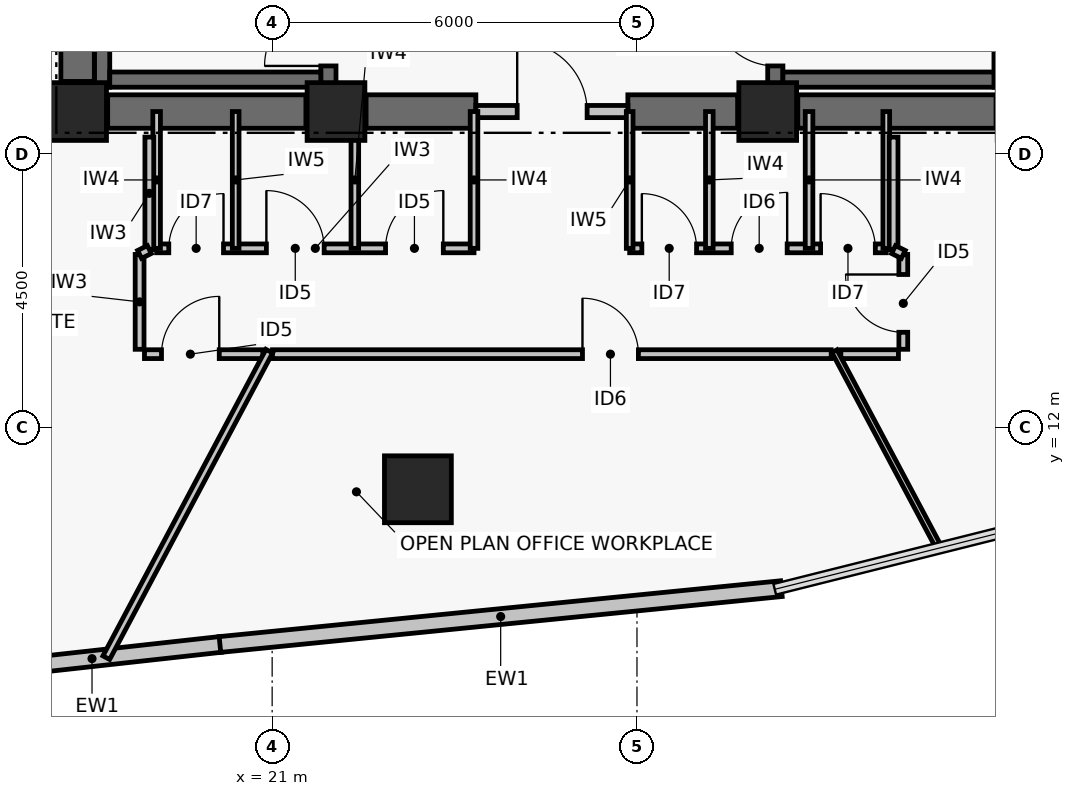
"""IFC4 building model, lengths in metres.
Left out: names, types, materials, properties, quantities, classifications, styles, units other than length and angle.
Written with IfcOpenShell. Run it as: python <this file> out.ifc"""

import sys

from ifc_helpers import new_model, si_unit, direction, frame, frame_2d, origin, origin_2d, place, context, subcontext, project, spatial, rectangle, hollow_rectangle, extrude, element, fill, save


model = new_model("IFC4")
c1 = context("Model", 3, precision=1e-05, world=origin(), true_north=direction((0.0, 1.0)))
c2 = subcontext(c1, "Body", "Model", "MODEL_VIEW")
j1 = project(units=[si_unit("LENGTHUNIT", "METRE"), si_unit("PLANEANGLEUNIT", "RADIAN")], contexts=[c1])
p1 = place(None, origin())
s1 = spatial("IfcSite", under=j1, at=p1, CompositionType="ELEMENT")
p2 = place(p1, origin())
s2 = spatial("IfcBuilding", under=s1, at=p2, CompositionType="ELEMENT")
p3 = place(p2, frame((0.0, 0.0, 161.76)))
s3 = spatial("IfcBuildingStorey", under=s2, at=p3, CompositionType="ELEMENT", Elevation=161.76)
for number, where, z_axis, x_axis in (
    (1, (17.8, 17.2, 0.0), (0.0, 0.0, 1.0), (1.0, 0.0, 0.0)),
    (2, (22.05, 17.2, 0.0), (0.0, 0.0, 1.0), (1.0, 0.0, 0.0)),
    (3, (29.15, 17.2, 0.0), (0.0, 0.0, 1.0), (1.0, 0.0, 0.0)),
):
    element("IfcColumn", number, at=place(p3, frame(where, z_axis=z_axis, x_axis=x_axis)), inside=s3, PredefinedType="COLUMN", context=c2, shape_type="SweptSolid", body=[
        extrude(rectangle(XDim=0.95, YDim=0.95, at=origin_2d()), origin(), (0.0, 0.0, 1.0), 3.72),
    ])
p4 = place(p3, frame((18.295, 17.2, 0.0), z_axis=(0.0, 0.0, 1.0), x_axis=(1.0, 0.0, 0.0)))
e4 = element("IfcWall", 4, at=p4, inside=s3, PredefinedType="SHEAR", context=c2, shape_type="SweptSolid", body=[
    extrude(rectangle(XDim=3.26, YDim=0.55, at=frame_2d((1.63, 0.0))), origin(), (0.0, 0.0, 1.0), 3.5),
])
p5 = place(p3, frame((22.545, 17.2, 0.0), z_axis=(0.0, 0.0, 1.0), x_axis=(1.0, 0.0, 0.0)))
e5 = element("IfcWall", 5, at=p5, inside=s3, PredefinedType="SHEAR", context=c2, shape_type="SweptSolid", body=[
    extrude(rectangle(XDim=1.805, YDim=0.55, at=frame_2d((0.903, 0.0))), origin(), (0.0, 0.0, 1.0), 3.5),
])
p6 = place(p3, frame((26.85, 17.2, 0.0), z_axis=(0.0, 0.0, 1.0), x_axis=(1.0, 0.0, 0.0)))
e6 = element("IfcWall", 6, at=p6, inside=s3, PredefinedType="SHEAR", context=c2, shape_type="SweptSolid", body=[
    extrude(rectangle(XDim=1.805, YDim=0.55, at=frame_2d((0.902, 0.0))), origin(), (0.0, 0.0, 1.0), 3.5),
])
p7 = place(p3, frame((29.645, 17.2, 0.0), z_axis=(0.0, 0.0, 1.0), x_axis=(1.0, 0.0, 0.0)))
e7 = element("IfcWall", 7, at=p7, inside=s3, PredefinedType="SHEAR", context=c2, shape_type="SweptSolid", body=[
    extrude(rectangle(XDim=3.26, YDim=0.55, at=frame_2d((1.63, 0.0))), origin(), (0.0, 0.0, 1.0), 3.5),
])
p8 = place(p3, frame((17.8, 17.695, 0.0), z_axis=(0.0, 0.0, 1.0), x_axis=(0.0, 1.0, 0.0)))
e8 = element("IfcWall", 8, at=p8, inside=s3, PredefinedType="SHEAR", context=c2, shape_type="SweptSolid", body=[
    extrude(rectangle(XDim=8.61, YDim=0.55, at=frame_2d((4.305, 0.0))), origin(), (0.0, 0.0, 1.0), 3.5),
])
p9 = place(p3, frame((18.204, 17.6, 0.0), z_axis=(0.0, 0.0, 1.0), x_axis=(0.0, 1.0, 0.0)))
e9 = element("IfcWall", 9, at=p9, inside=s3, PredefinedType="SHEAR", context=c2, shape_type="SweptSolid", body=[
    extrude(rectangle(XDim=8.8, YDim=0.25, at=frame_2d((4.4, 0.0))), origin(), (0.0, 0.0, 1.0), 3.5),
])
p10 = place(p3, frame((21.925, 17.6, 0.0), z_axis=(0.0, 0.0, 1.0), x_axis=(0.0, 1.0, 0.0)))
e10 = element("IfcWall", 10, at=p10, inside=s3, PredefinedType="SHEAR", context=c2, shape_type="SweptSolid", body=[
    extrude(rectangle(XDim=8.8, YDim=0.25, at=frame_2d((4.4, 0.0))), origin(), (0.0, 0.0, 1.0), 3.5),
])
p11 = place(p10, frame((0.35, 0.0, 0.0)))
e11 = element("IfcOpeningElement", 11, at=p11, cuts=e10, PredefinedType="OPENING", context=c2, shape_type="SweptSolid", body=[
    extrude(rectangle(XDim=1.05, YDim=2.08, at=frame_2d((0.525, 1.04))), frame((0.0, 0.135, 0.0), z_axis=(0.0, -1.0, 0.0), x_axis=(1.0, 0.0, 0.0)), (0.0, 0.0, 1.0), 0.27),
])
p12 = place(p3, frame((18.329, 17.725, 0.0), z_axis=(0.0, 0.0, 1.0), x_axis=(1.0, 0.0, 0.0)))
e12 = element("IfcWall", 12, at=p12, inside=s3, PredefinedType="SHEAR", context=c2, shape_type="SweptSolid", body=[
    extrude(rectangle(XDim=3.471, YDim=0.25, at=frame_2d((1.735, 0.0))), origin(), (0.0, 0.0, 1.0), 3.5),
])
p13 = place(p3, frame((29.275, 17.6, 0.0), z_axis=(0.0, 0.0, 1.0), x_axis=(0.0, 1.0, 0.0)))
e13 = element("IfcWall", 13, at=p13, inside=s3, PredefinedType="SHEAR", context=c2, shape_type="SweptSolid", body=[
    extrude(rectangle(XDim=8.8, YDim=0.25, at=frame_2d((4.4, 0.0))), origin(), (0.0, 0.0, 1.0), 3.5),
])
p14 = place(p13, frame((0.35, 0.0, 0.0)))
e14 = element("IfcOpeningElement", 14, at=p14, cuts=e13, PredefinedType="OPENING", context=c2, shape_type="SweptSolid", body=[
    extrude(rectangle(XDim=1.05, YDim=2.08, at=frame_2d((0.525, 1.04))), frame((0.0, 0.135, 0.0), z_axis=(0.0, -1.0, 0.0), x_axis=(1.0, 0.0, 0.0)), (0.0, 0.0, 1.0), 0.27),
])
p15 = place(p3, frame((32.996, 17.6, 0.0), z_axis=(0.0, 0.0, 1.0), x_axis=(0.0, 1.0, 0.0)))
e15 = element("IfcWall", 15, at=p15, inside=s3, PredefinedType="SHEAR", context=c2, shape_type="SweptSolid", body=[
    extrude(rectangle(XDim=8.8, YDim=0.25, at=frame_2d((4.4, 0.0))), origin(), (0.0, 0.0, 1.0), 3.5),
])
p16 = place(p3, frame((29.4, 17.725, 0.0), z_axis=(0.0, 0.0, 1.0), x_axis=(1.0, 0.0, 0.0)))
e16 = element("IfcWall", 16, at=p16, inside=s3, PredefinedType="SHEAR", context=c2, shape_type="SweptSolid", body=[
    extrude(rectangle(XDim=3.471, YDim=0.25, at=frame_2d((1.736, 0.0))), origin(), (0.0, 0.0, 1.0), 3.5),
])
p17 = place(p3, frame((23.397, 10.988, 0.0), z_axis=(0.0, 0.0, 1.0), x_axis=(1.0, 0.0, 0.0)))
e17 = element("IfcColumn", 17, at=p17, inside=s3, PredefinedType="COLUMN", context=c2, shape_type="SweptSolid", body=[
    extrude(hollow_rectangle(XDim=1.1, YDim=1.1, WallThickness=0.045, at=origin_2d()), origin(), (0.0, 0.0, 1.0), 3.72),
])
p18 = place(p3, frame((20.153, 8.437, 0.0), z_axis=(0.0, 0.0, 1.0), x_axis=(-0.993933978819, -0.109978387641, 0.0)))
e18 = element("IfcWall", 18, at=p18, inside=s3, PredefinedType="PARTITIONING", context=c2, shape_type="SweptSolid", body=[
    extrude(rectangle(XDim=4.258, YDim=0.26, at=frame_2d((2.129, 0.0))), origin(), (0.0, 0.0, 1.0), 3.5),
])
p19 = place(p3, frame((29.375, 9.354, 0.0), z_axis=(0.0, 0.0, 1.0), x_axis=(-0.9950896707, -0.098977508888, 0.0)))
e19 = element("IfcWall", 19, at=p19, inside=s3, PredefinedType="PARTITIONING", context=c2, shape_type="SweptSolid", body=[
    extrude(rectangle(XDim=9.28, YDim=0.26, at=frame_2d((4.64, 0.0))), origin(), (0.0, 0.0, 1.0), 3.5),
])
p20 = place(p3, frame((24.35, 17.2, 0.0), z_axis=(0.0, 0.0, 1.0), x_axis=(1.0, 0.0, 0.0)))
e20 = element("IfcWall", 20, at=p20, inside=s3, PredefinedType="PARTITIONING", context=c2, shape_type="SweptSolid", body=[
    extrude(rectangle(XDim=2.5, YDim=0.2, at=frame_2d((1.25, 0.0))), origin(), (0.0, 0.0, 1.0), 2.63),
])
p21 = place(p20, frame((0.68, 0.0, 0.0)))
e21 = element("IfcOpeningElement", 21, at=p21, cuts=e20, PredefinedType="OPENING", context=c2, shape_type="SweptSolid", body=[
    extrude(rectangle(XDim=1.15, YDim=2.08, at=frame_2d((0.575, 1.04))), frame((0.0, 0.11, 0.0), z_axis=(0.0, -1.0, 0.0), x_axis=(1.0, 0.0, 0.0)), (0.0, 0.0, 1.0), 0.22),
])
p22 = place(p3, frame((19.1, 14.95, 0.0), z_axis=(0.0, 0.0, 1.0), x_axis=(1.0, 0.0, 0.0)))
e22 = element("IfcWall", 22, at=p22, inside=s3, PredefinedType="PARTITIONING", context=c2, shape_type="SweptSolid", body=[
    extrude(rectangle(XDim=5.22, YDim=0.145, at=frame_2d((2.61, 0.0))), origin(), (0.0, 0.0, 1.0), 2.73),
])
p23 = place(p22, frame((0.2, 0.0, 0.0)))
e23 = element("IfcOpeningElement", 23, at=p23, cuts=e22, PredefinedType="OPENING", context=c2, shape_type="SweptSolid", body=[
    extrude(rectangle(XDim=0.9, YDim=2.02, at=frame_2d((0.45, 1.01))), frame((0.0, 0.083, 0.0), z_axis=(0.0, -1.0, 0.0), x_axis=(1.0, 0.0, 0.0)), (0.0, 0.0, 1.0), 0.165),
])
p24 = place(p22, frame((1.805, 0.0, 0.0)))
e24 = element("IfcOpeningElement", 24, at=p24, cuts=e22, PredefinedType="OPENING", context=c2, shape_type="SweptSolid", body=[
    extrude(rectangle(XDim=0.95, YDim=2.06, at=frame_2d((0.475, 1.03))), frame((0.0, 0.083, 0.0), z_axis=(0.0, -1.0, 0.0), x_axis=(1.0, 0.0, 0.0)), (0.0, 0.0, 1.0), 0.165),
])
p25 = place(p22, frame((3.765, 0.0, 0.0)))
e25 = element("IfcOpeningElement", 25, at=p25, cuts=e22, PredefinedType="OPENING", context=c2, shape_type="SweptSolid", body=[
    extrude(rectangle(XDim=0.95, YDim=2.06, at=frame_2d((0.475, 1.03))), frame((0.0, 0.083, 0.0), z_axis=(0.0, -1.0, 0.0), x_axis=(1.0, 0.0, 0.0)), (0.0, 0.0, 1.0), 0.165),
])
p26 = place(p3, frame((26.88, 14.95, 0.0), z_axis=(0.0, 0.0, 1.0), x_axis=(1.0, 0.0, 0.0)))
e26 = element("IfcWall", 26, at=p26, inside=s3, PredefinedType="PARTITIONING", context=c2, shape_type="SweptSolid", body=[
    extrude(rectangle(XDim=4.22, YDim=0.145, at=frame_2d((2.11, 0.0))), origin(), (0.0, 0.0, 1.0), 2.93),
])
p27 = place(p26, frame((0.2, 0.0, 0.0)))
e27 = element("IfcOpeningElement", 27, at=p27, cuts=e26, PredefinedType="OPENING", context=c2, shape_type="SweptSolid", body=[
    extrude(rectangle(XDim=0.9, YDim=2.02, at=frame_2d((0.45, 1.01))), frame((0.0, 0.083, 0.0), z_axis=(0.0, -1.0, 0.0), x_axis=(1.0, 0.0, 0.0)), (0.0, 0.0, 1.0), 0.165),
])
p28 = place(p26, frame((1.67, 0.0, 0.0)))
e28 = element("IfcOpeningElement", 28, at=p28, cuts=e26, PredefinedType="OPENING", context=c2, shape_type="SweptSolid", body=[
    extrude(rectangle(XDim=0.92, YDim=2.05, at=frame_2d((0.46, 1.025))), frame((0.0, 0.083, 0.0), z_axis=(0.0, -1.0, 0.0), x_axis=(1.0, 0.0, 0.0)), (0.0, 0.0, 1.0), 0.165),
])
p29 = place(p26, frame((3.14, 0.0, 0.0)))
e29 = element("IfcOpeningElement", 29, at=p29, cuts=e26, PredefinedType="OPENING", context=c2, shape_type="SweptSolid", body=[
    extrude(rectangle(XDim=0.9, YDim=2.02, at=frame_2d((0.45, 1.01))), frame((0.0, 0.083, 0.0), z_axis=(0.0, -1.0, 0.0), x_axis=(1.0, 0.0, 0.0)), (0.0, 0.0, 1.0), 0.165),
])
p30 = place(p3, frame((19.1, 14.95, 0.0), z_axis=(0.0, 0.0, 1.0), x_axis=(0.0, 1.0, 0.0)))
e30 = element("IfcWall", 30, at=p30, inside=s3, PredefinedType="PARTITIONING", context=c2, shape_type="SweptSolid", body=[
    extrude(rectangle(XDim=2.25, YDim=0.125, at=frame_2d((1.125, 0.0))), origin(), (0.0, 0.0, 1.0), 2.63),
])
p31 = place(p3, frame((20.4, 14.95, 0.0), z_axis=(0.0, 0.0, 1.0), x_axis=(0.0, 1.0, 0.0)))
e31 = element("IfcWall", 31, at=p31, inside=s3, PredefinedType="PARTITIONING", context=c2, shape_type="SweptSolid", body=[
    extrude(rectangle(XDim=2.25, YDim=0.11, at=frame_2d((1.125, 0.0))), origin(), (0.0, 0.0, 1.0), 2.63),
])
for number, where, z_axis, x_axis in (
    (32, (22.36, 14.95, 0.0), (0.0, 0.0, 1.0), (0.0, 1.0, 0.0)),
    (33, (24.32, 14.95, 0.0), (0.0, 0.0, 1.0), (0.0, 1.0, 0.0)),
):
    element("IfcWall", number, at=place(p3, frame(where, z_axis=z_axis, x_axis=x_axis)), inside=s3, PredefinedType="PARTITIONING", context=c2, shape_type="SweptSolid", body=[
        extrude(rectangle(XDim=2.25, YDim=0.125, at=frame_2d((1.125, 0.0))), origin(), (0.0, 0.0, 1.0), 2.63),
    ])
p32 = place(p3, frame((26.88, 14.95, 0.0), z_axis=(0.0, 0.0, 1.0), x_axis=(0.0, 1.0, 0.0)))
e34 = element("IfcWall", 34, at=p32, inside=s3, PredefinedType="PARTITIONING", context=c2, shape_type="SweptSolid", body=[
    extrude(rectangle(XDim=2.25, YDim=0.11, at=frame_2d((1.125, 0.0))), origin(), (0.0, 0.0, 1.0), 2.63),
])
for number, where, z_axis, x_axis in (
    (35, (28.19, 14.95, 0.0), (0.0, 0.0, 1.0), (0.0, 1.0, 0.0)),
    (36, (29.83, 14.95, 0.0), (0.0, 0.0, 1.0), (0.0, 1.0, 0.0)),
):
    element("IfcWall", number, at=place(p3, frame(where, z_axis=z_axis, x_axis=x_axis)), inside=s3, PredefinedType="PARTITIONING", context=c2, shape_type="SweptSolid", body=[
        extrude(rectangle(XDim=2.25, YDim=0.125, at=frame_2d((1.125, 0.0))), origin(), (0.0, 0.0, 1.0), 2.63),
    ])
p33 = place(p3, frame((31.1, 14.95, 0.0), z_axis=(0.0, 0.0, 1.0), x_axis=(0.0, 1.0, 0.0)))
e37 = element("IfcWall", 37, at=p33, inside=s3, PredefinedType="PARTITIONING", context=c2, shape_type="SweptSolid", body=[
    extrude(rectangle(XDim=2.25, YDim=0.11, at=frame_2d((1.125, 0.0))), origin(), (0.0, 0.0, 1.0), 2.63),
])
p34 = place(p3, frame((18.98, 16.78, 0.0), z_axis=(0.0, 0.0, 1.0), x_axis=(0.0, -1.0, 0.0)))
e38 = element("IfcWall", 38, at=p34, inside=s3, PredefinedType="PARTITIONING", context=c2, shape_type="SweptSolid", body=[
    extrude(rectangle(XDim=1.85, YDim=0.145, at=frame_2d((0.925, 0.0))), origin(), (0.0, 0.0, 1.0), 2.63),
])
p35 = place(p3, frame((18.82, 14.85, 0.0), z_axis=(0.0, 0.0, 1.0), x_axis=(0.0, -1.0, 0.0)))
e39 = element("IfcWall", 39, at=p35, inside=s3, PredefinedType="PARTITIONING", context=c2, shape_type="SweptSolid", body=[
    extrude(rectangle(XDim=1.56, YDim=0.145, at=frame_2d((0.78, 0.0))), origin(), (0.0, 0.0, 1.0), 3.08),
])
p36 = place(p3, frame((18.9, 13.21, 0.0), z_axis=(0.0, 0.0, 1.0), x_axis=(1.0, 0.0, 0.0)))
e40 = element("IfcWall", 40, at=p36, inside=s3, PredefinedType="PARTITIONING", context=c2, shape_type="SweptSolid", body=[
    extrude(rectangle(XDim=1.947, YDim=0.145, at=frame_2d((0.974, 0.0))), origin(), (0.0, 0.0, 1.0), 3.08),
])
p37 = place(p36, frame((0.28, 0.0, 0.0)))
e41 = element("IfcOpeningElement", 41, at=p37, cuts=e40, PredefinedType="OPENING", context=c2, shape_type="SweptSolid", body=[
    extrude(rectangle(XDim=0.95, YDim=2.06, at=frame_2d((0.475, 1.03))), frame((0.0, 0.083, 0.0), z_axis=(0.0, -1.0, 0.0), x_axis=(1.0, 0.0, 0.0)), (0.0, 0.0, 1.0), 0.165),
])
p38 = place(p3, frame((21.006, 13.21, 0.0), z_axis=(0.0, 0.0, 1.0), x_axis=(1.0, 0.0, 0.0)))
e42 = element("IfcWall", 42, at=p38, inside=s3, PredefinedType="PARTITIONING", context=c2, shape_type="SweptSolid", body=[
    extrude(rectangle(XDim=9.189, YDim=0.145, at=frame_2d((4.594, 0.0))), origin(), (0.0, 0.0, 1.0), 2.73),
])
p39 = place(p38, frame((5.098, 0.0, 0.0)))
e43 = element("IfcOpeningElement", 43, at=p39, cuts=e42, PredefinedType="OPENING", context=c2, shape_type="SweptSolid", body=[
    extrude(rectangle(XDim=0.92, YDim=2.05, at=frame_2d((0.46, 1.025))), frame((0.0, 0.083, 0.0), z_axis=(0.0, -1.0, 0.0), x_axis=(1.0, 0.0, 0.0)), (0.0, 0.0, 1.0), 0.165),
])
p40 = place(p3, frame((30.353, 13.21, 0.0), z_axis=(0.0, 0.0, 1.0), x_axis=(1.0, 0.0, 0.0)))
e44 = element("IfcWall", 44, at=p40, inside=s3, PredefinedType="PARTITIONING", context=c2, shape_type="SweptSolid", body=[
    extrude(rectangle(XDim=0.947, YDim=0.145, at=frame_2d((0.474, 0.0))), origin(), (0.0, 0.0, 1.0), 3.5),
])
p41 = place(p3, frame((31.38, 13.29, 0.0), z_axis=(0.0, 0.0, 1.0), x_axis=(0.0, 1.0, 0.0)))
e45 = element("IfcWall", 45, at=p41, inside=s3, PredefinedType="PARTITIONING", context=c2, shape_type="SweptSolid", body=[
    extrude(rectangle(XDim=1.56, YDim=0.145, at=frame_2d((0.78, 0.0))), origin(), (0.0, 0.0, 1.0), 3.5),
])
p42 = place(p41, frame((0.28, 0.0, 0.0)))
e46 = element("IfcOpeningElement", 46, at=p42, cuts=e45, PredefinedType="OPENING", context=c2, shape_type="SweptSolid", body=[
    extrude(rectangle(XDim=0.95, YDim=2.06, at=frame_2d((0.475, 1.03))), frame((0.0, 0.083, 0.0), z_axis=(0.0, -1.0, 0.0), x_axis=(1.0, 0.0, 0.0)), (0.0, 0.0, 1.0), 0.165),
])
p43 = place(p3, frame((31.22, 14.93, 0.0), z_axis=(0.0, 0.0, 1.0), x_axis=(0.0, 1.0, 0.0)))
e47 = element("IfcWall", 47, at=p43, inside=s3, PredefinedType="PARTITIONING", context=c2, shape_type="SweptSolid", body=[
    extrude(rectangle(XDim=1.85, YDim=0.145, at=frame_2d((0.925, 0.0))), origin(), (0.0, 0.0, 1.0), 2.63),
])
p44 = place(p3, frame((20.953, 13.26, 0.0), z_axis=(0.0, 0.0, 1.0), x_axis=(-0.469478237377, -0.882944043883, 0.0)))
e48 = element("IfcWall", 48, at=p44, inside=s3, PredefinedType="PARTITIONING", context=c2, shape_type="SweptSolid", body=[
    extrude(rectangle(XDim=5.71, YDim=0.125, at=frame_2d((2.855, 0.0))), origin(), (0.0, 0.0, 1.0), 2.93),
])
p45 = place(p3, frame((30.247, 13.26, 0.0), z_axis=(0.0, 0.0, 1.0), x_axis=(0.469475406562, -0.882945549076, 0.0)))
e49 = element("IfcWall", 49, at=p45, inside=s3, PredefinedType="PARTITIONING", context=c2, shape_type="SweptSolid", body=[
    extrude(rectangle(XDim=3.679, YDim=0.095, at=frame_2d((1.84, 0.0))), origin(), (0.0, 0.0, 1.0), 3.5),
])
for number, where, z_axis, x_axis in (
    (50, (18.82, 14.85, 0.0), (0.0, 0.0, 1.0), (0.895, 0.447, 0.0)),
    (51, (31.38, 14.85, 0.0), (0.0, 0.0, 1.0), (-0.895, 0.447, 0.0)),
):
    element("IfcWall", number, at=place(p3, frame(where, z_axis=z_axis, x_axis=x_axis)), inside=s3, PredefinedType="PARTITIONING", context=c2, shape_type="SweptSolid", body=[
        extrude(rectangle(XDim=0.179, YDim=0.145, at=frame_2d((0.089, 0.0))), origin(), (0.0, 0.0, 1.0), 3.5),
    ])
p46 = place(p11, origin())
e52 = element("IfcDoor", 52, at=p46, inside=s3, OperationType="SINGLE_SWING_LEFT", PredefinedType="DOOR", context=c2, shape_type="SweptSolid", body=[
    extrude(rectangle(XDim=1.05, YDim=2.08, at=frame_2d((0.525, 1.04))), frame((0.0, 0.025, 0.0), z_axis=(0.0, -1.0, 0.0), x_axis=(1.0, 0.0, 0.0)), (0.0, 0.0, 1.0), 0.05),
])
fill(e11, e52)
p47 = place(p14, origin())
e53 = element("IfcDoor", 53, at=p47, inside=s3, OperationType="SINGLE_SWING_RIGHT", PredefinedType="DOOR", context=c2, shape_type="SweptSolid", body=[
    extrude(rectangle(XDim=1.05, YDim=2.08, at=frame_2d((0.525, 1.04))), frame((0.0, 0.025, 0.0), z_axis=(0.0, -1.0, 0.0), x_axis=(1.0, 0.0, 0.0)), (0.0, 0.0, 1.0), 0.05),
])
fill(e14, e53)
p48 = place(p21, origin())
e54 = element("IfcDoor", 54, at=p48, inside=s3, OperationType="SINGLE_SWING_LEFT", PredefinedType="DOOR", context=c2, shape_type="SweptSolid", body=[
    extrude(rectangle(XDim=1.15, YDim=2.08, at=frame_2d((0.575, 1.04))), frame((0.0, 0.025, 0.0), z_axis=(0.0, -1.0, 0.0), x_axis=(1.0, 0.0, 0.0)), (0.0, 0.0, 1.0), 0.05),
])
fill(e21, e54)
p49 = place(p23, origin())
e55 = element("IfcDoor", 55, at=p49, inside=s3, OperationType="SINGLE_SWING_RIGHT", PredefinedType="DOOR", context=c2, shape_type="SweptSolid", body=[
    extrude(rectangle(XDim=0.9, YDim=2.02, at=frame_2d((0.45, 1.01))), frame((0.0, 0.025, 0.0), z_axis=(0.0, -1.0, 0.0), x_axis=(1.0, 0.0, 0.0)), (0.0, 0.0, 1.0), 0.05),
])
fill(e23, e55)
p50 = place(p24, origin())
e56 = element("IfcDoor", 56, at=p50, inside=s3, OperationType="SINGLE_SWING_LEFT", PredefinedType="DOOR", context=c2, shape_type="SweptSolid", body=[
    extrude(rectangle(XDim=0.95, YDim=2.06, at=frame_2d((0.475, 1.03))), frame((0.0, 0.025, 0.0), z_axis=(0.0, -1.0, 0.0), x_axis=(1.0, 0.0, 0.0)), (0.0, 0.0, 1.0), 0.05),
])
fill(e24, e56)
p51 = place(p25, origin())
e57 = element("IfcDoor", 57, at=p51, inside=s3, OperationType="SINGLE_SWING_RIGHT", PredefinedType="DOOR", context=c2, shape_type="SweptSolid", body=[
    extrude(rectangle(XDim=0.95, YDim=2.06, at=frame_2d((0.475, 1.03))), frame((0.0, 0.025, 0.0), z_axis=(0.0, -1.0, 0.0), x_axis=(1.0, 0.0, 0.0)), (0.0, 0.0, 1.0), 0.05),
])
fill(e25, e57)
p52 = place(p27, origin())
e58 = element("IfcDoor", 58, at=p52, inside=s3, OperationType="SINGLE_SWING_LEFT", PredefinedType="DOOR", context=c2, shape_type="SweptSolid", body=[
    extrude(rectangle(XDim=0.9, YDim=2.02, at=frame_2d((0.45, 1.01))), frame((0.0, 0.025, 0.0), z_axis=(0.0, -1.0, 0.0), x_axis=(1.0, 0.0, 0.0)), (0.0, 0.0, 1.0), 0.05),
])
fill(e27, e58)
p53 = place(p28, origin())
e59 = element("IfcDoor", 59, at=p53, inside=s3, OperationType="SINGLE_SWING_RIGHT", PredefinedType="DOOR", context=c2, shape_type="SweptSolid", body=[
    extrude(rectangle(XDim=0.92, YDim=2.05, at=frame_2d((0.46, 1.025))), frame((0.0, 0.025, 0.0), z_axis=(0.0, -1.0, 0.0), x_axis=(1.0, 0.0, 0.0)), (0.0, 0.0, 1.0), 0.05),
])
fill(e28, e59)
p54 = place(p29, origin())
e60 = element("IfcDoor", 60, at=p54, inside=s3, OperationType="SINGLE_SWING_LEFT", PredefinedType="DOOR", context=c2, shape_type="SweptSolid", body=[
    extrude(rectangle(XDim=0.9, YDim=2.02, at=frame_2d((0.45, 1.01))), frame((0.0, 0.025, 0.0), z_axis=(0.0, -1.0, 0.0), x_axis=(1.0, 0.0, 0.0)), (0.0, 0.0, 1.0), 0.05),
])
fill(e29, e60)
p55 = place(p37, origin())
e61 = element("IfcDoor", 61, at=p55, inside=s3, OperationType="SINGLE_SWING_RIGHT", PredefinedType="DOOR", context=c2, shape_type="SweptSolid", body=[
    extrude(rectangle(XDim=0.95, YDim=2.06, at=frame_2d((0.475, 1.03))), frame((0.0, 0.025, 0.0), z_axis=(0.0, -1.0, 0.0), x_axis=(1.0, 0.0, 0.0)), (0.0, 0.0, 1.0), 0.05),
])
fill(e41, e61)
p56 = place(p39, origin())
e62 = element("IfcDoor", 62, at=p56, inside=s3, OperationType="SINGLE_SWING_LEFT", PredefinedType="DOOR", context=c2, shape_type="SweptSolid", body=[
    extrude(rectangle(XDim=0.92, YDim=2.05, at=frame_2d((0.46, 1.025))), frame((0.0, 0.025, 0.0), z_axis=(0.0, -1.0, 0.0), x_axis=(1.0, 0.0, 0.0)), (0.0, 0.0, 1.0), 0.05),
])
fill(e43, e62)
p57 = place(p42, origin())
e63 = element("IfcDoor", 63, at=p57, inside=s3, OperationType="SINGLE_SWING_RIGHT", PredefinedType="DOOR", context=c2, shape_type="SweptSolid", body=[
    extrude(rectangle(XDim=0.95, YDim=2.06, at=frame_2d((0.475, 1.03))), frame((0.0, 0.025, 0.0), z_axis=(0.0, -1.0, 0.0), x_axis=(1.0, 0.0, 0.0)), (0.0, 0.0, 1.0), 0.05),
])
fill(e46, e63)
save(model, sys.argv[1])
